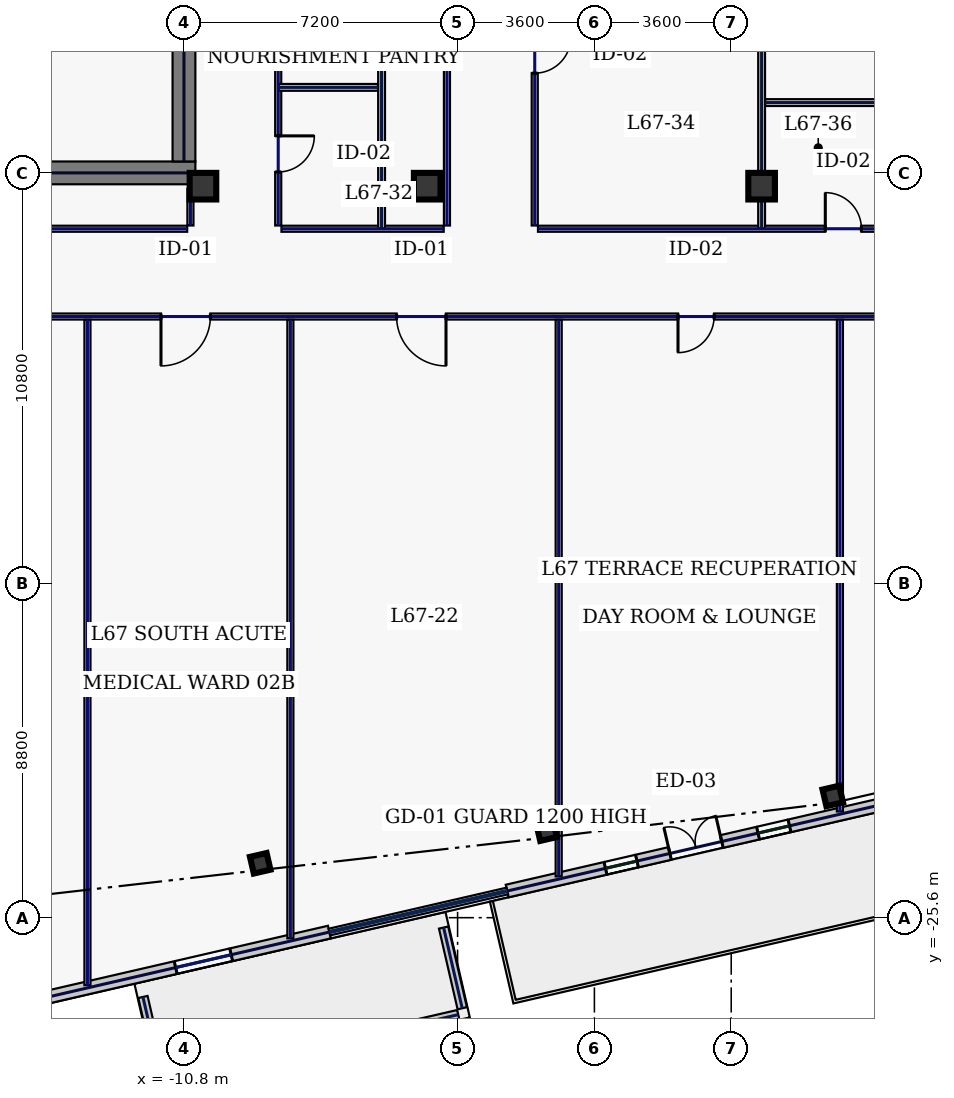
"""IFC4 building model, lengths in metres.
Left out: names, types, materials, properties, quantities, classifications, styles, units other than length and angle.
Written with IfcOpenShell. Run it as: python <this file> out.ifc"""

import sys

from ifc_helpers import new_model, si_unit, direction, frame, frame_2d, origin, origin_2d, place, context, subcontext, project, spatial, rectangle, hollow_rectangle, extrude, element, fill, save


model = new_model("IFC4")
c1 = context("Model", 3, precision=1e-05, world=origin(), true_north=direction((0.0, 1.0)))
c2 = subcontext(c1, "Body", "Model", "MODEL_VIEW")
j1 = project(units=[si_unit("LENGTHUNIT", "METRE"), si_unit("PLANEANGLEUNIT", "RADIAN")], contexts=[c1])
p1 = place(None, origin())
s1 = spatial("IfcSite", under=j1, at=p1, CompositionType="ELEMENT")
p2 = place(p1, origin())
s2 = spatial("IfcBuilding", under=s1, at=p2, CompositionType="ELEMENT")
p3 = place(p2, frame((0.0, 0.0, 289.0)))
s3 = spatial("IfcBuildingStorey", under=s2, at=p3, CompositionType="ELEMENT", Elevation=289.0)
p4 = place(p3, frame((-22.0, -6.0, 0.0), z_axis=(0.0, 0.0, 1.0), x_axis=(1.0, 0.0, 0.0)))
e1 = element("IfcWall", 1, at=p4, inside=s3, PredefinedType="SHEAR", context=c2, shape_type="SweptSolid", body=[
    extrude(rectangle(XDim=11.5, YDim=0.6, at=frame_2d((5.75, 0.0))), origin(), (0.0, 0.0, 1.0), 3.74),
])
p5 = place(p3, frame((-10.8, -5.7, 0.0), z_axis=(0.0, 0.0, 1.0), x_axis=(0.0, 1.0, 0.0)))
e2 = element("IfcWall", 2, at=p5, inside=s3, PredefinedType="SHEAR", context=c2, shape_type="SweptSolid", body=[
    extrude(rectangle(XDim=3.05, YDim=0.6, at=frame_2d((1.525, 0.0))), origin(), (0.0, 0.0, 1.0), 3.74),
])
for number, where, z_axis, x_axis in (
    (3, (-10.3, -6.35, 0.0), (0.0, 0.0, 1.0), (1.0, 0.0, 0.0)),
    (4, (-4.4, -6.35, 0.0), (0.0, 0.0, 1.0), (1.0, 0.0, 0.0)),
    (5, (4.4, -6.35, 0.0), (0.0, 0.0, 1.0), (1.0, 0.0, 0.0)),
):
    element("IfcColumn", number, at=place(p3, frame(where, z_axis=z_axis, x_axis=x_axis)), inside=s3, PredefinedType="COLUMN", context=c2, shape_type="SweptSolid", body=[
        extrude(hollow_rectangle(XDim=0.7, YDim=0.7, WallThickness=0.032, at=origin_2d()), origin(), (0.0, 0.0, 1.0), 3.74),
    ])
for number, where, z_axis, x_axis in (
    (6, (-8.794, -24.168, 0.0), (0.0, 0.0, 1.0), (0.974, 0.225, 0.0)),
    (7, (-1.258, -23.31, 0.0), (0.0, 0.0, 1.0), (0.974, 0.225, 0.0)),
    (8, (6.273, -22.397, 0.0), (0.0, 0.0, 1.0), (0.974, 0.225, 0.0)),
):
    element("IfcColumn", number, at=place(p3, frame(where, z_axis=z_axis, x_axis=x_axis)), inside=s3, PredefinedType="COLUMN", context=c2, shape_type="SweptSolid", body=[
        extrude(hollow_rectangle(XDim=0.45, YDim=0.45, WallThickness=0.022, at=origin_2d()), origin(), (0.0, 0.0, 1.0), 3.74),
    ])
p6 = place(p3, frame((-11.88, -27.686, 0.0), z_axis=(0.0, 0.0, 1.0), x_axis=(0.224998554752, -0.974359097232, 0.0)))
e9 = element("IfcWall", 9, at=p6, inside=s3, PredefinedType="PARAPET", context=c2, shape_type="SweptSolid", body=[
    extrude(rectangle(XDim=2.18, YDim=0.25, at=frame_2d((1.09, 0.0))), origin(), (0.0, 0.0, 1.0), 1.15),
])
p7 = place(p3, frame((-11.222, -29.915, 0.0), z_axis=(0.0, 0.0, 1.0), x_axis=(0.974369148124, 0.224955024802, 0.0)))
e10 = element("IfcWall", 10, at=p7, inside=s3, PredefinedType="PARAPET", context=c2, shape_type="SweptSolid", body=[
    extrude(rectangle(XDim=7.84, YDim=0.25, at=frame_2d((3.92, 0.0))), origin(), (0.0, 0.0, 1.0), 1.15),
])
p8 = place(p3, frame((-3.478, -27.983, 0.0), z_axis=(0.0, 0.0, 1.0), x_axis=(-0.224998554752, 0.974359097232, 0.0)))
e11 = element("IfcWall", 11, at=p8, inside=s3, PredefinedType="PARAPET", context=c2, shape_type="SweptSolid", body=[
    extrude(rectangle(XDim=2.18, YDim=0.25, at=frame_2d((1.09, 0.0))), origin(), (0.0, 0.0, 1.0), 1.15),
])
p9 = place(p3, frame((-24.03, -29.916, 0.0), z_axis=(0.0, 0.0, 1.0), x_axis=(0.974370978061, 0.224947098473, 0.0)))
e12 = element("IfcWall", 12, at=p9, inside=s3, PredefinedType="STANDARD", context=c2, shape_type="SweptSolid", body=[
    extrude(rectangle(XDim=17.506, YDim=0.34, at=frame_2d((8.753, 0.0))), origin(), (0.0, 0.0, 1.0), 3.74),
])
p10 = place(p9, frame((2.35, 0.0, 0.9)))
e13 = element("IfcOpeningElement", 13, at=p10, cuts=e12, PredefinedType="OPENING", context=c2, shape_type="SweptSolid", body=[
    extrude(rectangle(XDim=1.5, YDim=2.0, at=frame_2d((0.75, 1.0))), frame((0.0, 0.18, 0.0), z_axis=(0.0, -1.0, 0.0), x_axis=(1.0, 0.0, 0.0)), (0.0, 0.0, 1.0), 0.36),
])
p11 = place(p9, frame((5.817, 0.0, 0.9)))
e14 = element("IfcOpeningElement", 14, at=p11, cuts=e12, PredefinedType="OPENING", context=c2, shape_type="SweptSolid", body=[
    extrude(rectangle(XDim=1.5, YDim=2.0, at=frame_2d((0.75, 1.0))), frame((0.0, 0.18, 0.0), z_axis=(0.0, -1.0, 0.0), x_axis=(1.0, 0.0, 0.0)), (0.0, 0.0, 1.0), 0.36),
])
p12 = place(p9, frame((13.353, 0.0, 0.9)))
e15 = element("IfcOpeningElement", 15, at=p12, cuts=e12, PredefinedType="OPENING", context=c2, shape_type="SweptSolid", body=[
    extrude(rectangle(XDim=1.5, YDim=2.0, at=frame_2d((0.75, 1.0))), frame((0.0, 0.18, 0.0), z_axis=(0.0, -1.0, 0.0), x_axis=(1.0, 0.0, 0.0)), (0.0, 0.0, 1.0), 0.36),
])
p13 = place(p3, frame((-2.295, -24.898, 0.0), z_axis=(0.0, 0.0, 1.0), x_axis=(0.974370872906, 0.224947553958, 0.0)))
e16 = element("IfcWall", 16, at=p13, inside=s3, PredefinedType="STANDARD", context=c2, shape_type="SweptSolid", body=[
    extrude(rectangle(XDim=10.328, YDim=0.34, at=frame_2d((5.164, 0.0))), origin(), (0.0, 0.0, 1.0), 3.74),
])
p14 = place(p13, frame((4.394, 0.0, 0.0)))
e17 = element("IfcOpeningElement", 17, at=p14, cuts=e16, PredefinedType="OPENING", context=c2, shape_type="SweptSolid", body=[
    extrude(rectangle(XDim=1.4, YDim=2.2, at=frame_2d((0.7, 1.1))), frame((0.0, 0.18, 0.0), z_axis=(0.0, -1.0, 0.0), x_axis=(1.0, 0.0, 0.0)), (0.0, 0.0, 1.0), 0.36),
])
p15 = place(p13, frame((2.655, 0.0, 0.9)))
e18 = element("IfcOpeningElement", 18, at=p15, cuts=e16, PredefinedType="OPENING", context=c2, shape_type="SweptSolid", body=[
    extrude(rectangle(XDim=0.85, YDim=1.85, at=frame_2d((0.425, 0.925))), frame((0.0, 0.18, 0.0), z_axis=(0.0, -1.0, 0.0), x_axis=(1.0, 0.0, 0.0)), (0.0, 0.0, 1.0), 0.36),
])
p16 = place(p13, frame((6.774, 0.0, 0.9)))
e19 = element("IfcOpeningElement", 19, at=p16, cuts=e16, PredefinedType="OPENING", context=c2, shape_type="SweptSolid", body=[
    extrude(rectangle(XDim=0.85, YDim=1.85, at=frame_2d((0.425, 0.925))), frame((0.0, 0.18, 0.0), z_axis=(0.0, -1.0, 0.0), x_axis=(1.0, 0.0, 0.0)), (0.0, 0.0, 1.0), 0.36),
])
p17 = place(p3, frame((12.535, -9.78, 0.0), z_axis=(0.0, 0.0, 1.0), x_axis=(-1.0, 0.0, 0.0)))
e20 = element("IfcWall", 20, at=p17, inside=s3, PredefinedType="PARTITIONING", context=c2, shape_type="SweptSolid", body=[
    extrude(rectangle(XDim=36.68, YDim=0.16, at=frame_2d((18.34, 0.0))), origin(), (0.0, 0.0, 1.0), 3.74),
])
p18 = place(p17, frame((33.856, 0.0, 0.0)))
e21 = element("IfcOpeningElement", 21, at=p18, cuts=e20, PredefinedType="OPENING", context=c2, shape_type="SweptSolid", body=[
    extrude(rectangle(XDim=1.05, YDim=2.2, at=frame_2d((0.525, 1.1))), frame((0.0, 0.09, 0.0), z_axis=(0.0, -1.0, 0.0), x_axis=(1.0, 0.0, 0.0)), (0.0, 0.0, 1.0), 0.18),
])
p19 = place(p17, frame((28.43, 0.0, 0.0)))
e22 = element("IfcOpeningElement", 22, at=p19, cuts=e20, PredefinedType="OPENING", context=c2, shape_type="SweptSolid", body=[
    extrude(rectangle(XDim=1.3, YDim=2.2, at=frame_2d((0.65, 1.1))), frame((0.0, 0.09, 0.0), z_axis=(0.0, -1.0, 0.0), x_axis=(1.0, 0.0, 0.0)), (0.0, 0.0, 1.0), 0.18),
])
p20 = place(p17, frame((22.64, 0.0, 0.0)))
e23 = element("IfcOpeningElement", 23, at=p20, cuts=e20, PredefinedType="OPENING", context=c2, shape_type="SweptSolid", body=[
    extrude(rectangle(XDim=1.3, YDim=2.2, at=frame_2d((0.65, 1.1))), frame((0.0, 0.09, 0.0), z_axis=(0.0, -1.0, 0.0), x_axis=(1.0, 0.0, 0.0)), (0.0, 0.0, 1.0), 0.18),
])
p21 = place(p17, frame((16.44, 0.0, 0.0)))
e24 = element("IfcOpeningElement", 24, at=p21, cuts=e20, PredefinedType="OPENING", context=c2, shape_type="SweptSolid", body=[
    extrude(rectangle(XDim=1.3, YDim=2.2, at=frame_2d((0.65, 1.1))), frame((0.0, 0.09, 0.0), z_axis=(0.0, -1.0, 0.0), x_axis=(1.0, 0.0, 0.0)), (0.0, 0.0, 1.0), 0.18),
])
p22 = place(p17, frame((9.385, 0.0, 0.0)))
e25 = element("IfcOpeningElement", 25, at=p22, cuts=e20, PredefinedType="OPENING", context=c2, shape_type="SweptSolid", body=[
    extrude(rectangle(XDim=0.95, YDim=2.2, at=frame_2d((0.475, 1.1))), frame((0.0, 0.09, 0.0), z_axis=(0.0, -1.0, 0.0), x_axis=(1.0, 0.0, 0.0)), (0.0, 0.0, 1.0), 0.18),
])
p23 = place(p17, frame((2.799, 0.0, 0.0)))
e26 = element("IfcOpeningElement", 26, at=p23, cuts=e20, PredefinedType="OPENING", context=c2, shape_type="SweptSolid", body=[
    extrude(rectangle(XDim=1.05, YDim=2.2, at=frame_2d((0.525, 1.1))), frame((0.0, 0.09, 0.0), z_axis=(0.0, -1.0, 0.0), x_axis=(1.0, 0.0, 0.0)), (0.0, 0.0, 1.0), 0.18),
])
p24 = place(p3, frame((-1.57, 7.435, 0.0), z_axis=(0.0, 0.0, 1.0), x_axis=(0.0, -1.0, 0.0)))
e27 = element("IfcWall", 27, at=p24, inside=s3, PredefinedType="PARTITIONING", context=c2, shape_type="SweptSolid", body=[
    extrude(rectangle(XDim=14.82, YDim=0.16, at=frame_2d((7.41, 0.0))), origin(), (0.0, 0.0, 1.0), 3.74),
])
p25 = place(p24, frame((9.861, 0.0, 0.0)))
e28 = element("IfcOpeningElement", 28, at=p25, cuts=e27, PredefinedType="OPENING", context=c2, shape_type="SweptSolid", body=[
    extrude(rectangle(XDim=0.95, YDim=2.2, at=frame_2d((0.475, 1.1))), frame((0.0, 0.09, 0.0), z_axis=(0.0, -1.0, 0.0), x_axis=(1.0, 0.0, 0.0)), (0.0, 0.0, 1.0), 0.18),
])
p26 = place(p24, frame((2.754, 0.0, 0.0)))
e29 = element("IfcOpeningElement", 29, at=p26, cuts=e27, PredefinedType="OPENING", context=c2, shape_type="SweptSolid", body=[
    extrude(rectangle(XDim=0.95, YDim=2.2, at=frame_2d((0.475, 1.1))), frame((0.0, 0.09, 0.0), z_axis=(0.0, -1.0, 0.0), x_axis=(1.0, 0.0, 0.0)), (0.0, 0.0, 1.0), 0.18),
])
p27 = place(p3, frame((-1.485, -7.47, 0.0), z_axis=(0.0, 0.0, 1.0), x_axis=(1.0, 0.0, 0.0)))
e30 = element("IfcWall", 30, at=p27, inside=s3, PredefinedType="PARTITIONING", context=c2, shape_type="SweptSolid", body=[
    extrude(rectangle(XDim=9.72, YDim=0.16, at=frame_2d((4.86, 0.0))), origin(), (0.0, 0.0, 1.0), 3.74),
])
p28 = place(p27, frame((7.561, 0.0, 0.0)))
e31 = element("IfcOpeningElement", 31, at=p28, cuts=e30, PredefinedType="OPENING", context=c2, shape_type="SweptSolid", body=[
    extrude(rectangle(XDim=0.95, YDim=2.2, at=frame_2d((0.475, 1.1))), frame((0.0, 0.09, 0.0), z_axis=(0.0, -1.0, 0.0), x_axis=(1.0, 0.0, 0.0)), (0.0, 0.0, 1.0), 0.18),
])
p29 = place(p3, frame((-3.88, -7.385, 0.0), z_axis=(0.0, 0.0, 1.0), x_axis=(0.0, 1.0, 0.0)))
e32 = element("IfcWall", 32, at=p29, inside=s3, PredefinedType="PARTITIONING", context=c2, shape_type="SweptSolid", body=[
    extrude(rectangle(XDim=14.82, YDim=0.16, at=frame_2d((7.41, 0.0))), origin(), (0.0, 0.0, 1.0), 3.74),
])
p30 = place(p3, frame((-8.32, 7.435, 0.0), z_axis=(0.0, 0.0, 1.0), x_axis=(0.0, -1.0, 0.0)))
e33 = element("IfcWall", 33, at=p30, inside=s3, PredefinedType="PARTITIONING", context=c2, shape_type="SweptSolid", body=[
    extrude(rectangle(XDim=14.82, YDim=0.16, at=frame_2d((7.41, 0.0))), origin(), (0.0, 0.0, 1.0), 3.74),
])
p31 = place(p30, frame((12.461, 0.0, 0.0)))
e34 = element("IfcOpeningElement", 34, at=p31, cuts=e33, PredefinedType="OPENING", context=c2, shape_type="SweptSolid", body=[
    extrude(rectangle(XDim=0.95, YDim=2.2, at=frame_2d((0.475, 1.1))), frame((0.0, 0.09, 0.0), z_axis=(0.0, -1.0, 0.0), x_axis=(1.0, 0.0, 0.0)), (0.0, 0.0, 1.0), 0.18),
])
p32 = place(p30, frame((5.354, 0.0, 0.0)))
e35 = element("IfcOpeningElement", 35, at=p32, cuts=e33, PredefinedType="OPENING", context=c2, shape_type="SweptSolid", body=[
    extrude(rectangle(XDim=0.95, YDim=2.2, at=frame_2d((0.475, 1.1))), frame((0.0, 0.09, 0.0), z_axis=(0.0, -1.0, 0.0), x_axis=(1.0, 0.0, 0.0)), (0.0, 0.0, 1.0), 0.18),
])
p33 = place(p3, frame((-8.235, -7.47, 0.0), z_axis=(0.0, 0.0, 1.0), x_axis=(1.0, 0.0, 0.0)))
e36 = element("IfcWall", 36, at=p33, inside=s3, PredefinedType="PARTITIONING", context=c2, shape_type="SweptSolid", body=[
    extrude(rectangle(XDim=4.27, YDim=0.16, at=frame_2d((2.135, 0.0))), origin(), (0.0, 0.0, 1.0), 3.74),
])
p34 = place(p3, frame((-10.63, -7.385, 0.0), z_axis=(0.0, 0.0, 1.0), x_axis=(0.0, 1.0, 0.0)))
e37 = element("IfcWall", 37, at=p34, inside=s3, PredefinedType="PARTITIONING", context=c2, shape_type="SweptSolid", body=[
    extrude(rectangle(XDim=0.965, YDim=0.16, at=frame_2d((0.482, 0.0))), origin(), (0.0, 0.0, 1.0), 3.74),
])
p35 = place(p3, frame((-21.915, -7.47, 0.0), z_axis=(0.0, 0.0, 1.0), x_axis=(1.0, 0.0, 0.0)))
e38 = element("IfcWall", 38, at=p35, inside=s3, PredefinedType="PARTITIONING", context=c2, shape_type="SweptSolid", body=[
    extrude(rectangle(XDim=11.2, YDim=0.16, at=frame_2d((5.6, 0.0))), origin(), (0.0, 0.0, 1.0), 3.74),
])
p36 = place(p3, frame((-8.0, -26.144, 0.0), z_axis=(0.0, 0.0, 1.0), x_axis=(0.0, 1.0, 0.0)))
e39 = element("IfcWall", 39, at=p36, inside=s3, PredefinedType="PARTITIONING", context=c2, shape_type="SweptSolid", body=[
    extrude(rectangle(XDim=16.279, YDim=0.16, at=frame_2d((8.139, 0.0))), origin(), (0.0, 0.0, 1.0), 3.74),
])
p37 = place(p3, frame((-0.94, -24.514, 0.0), z_axis=(0.0, 0.0, 1.0), x_axis=(0.0, 1.0, 0.0)))
e40 = element("IfcWall", 40, at=p37, inside=s3, PredefinedType="PARTITIONING", context=c2, shape_type="SweptSolid", body=[
    extrude(rectangle(XDim=14.649, YDim=0.16, at=frame_2d((7.324, 0.0))), origin(), (0.0, 0.0, 1.0), 3.74),
])
p38 = place(p3, frame((6.46, -22.805, 0.0), z_axis=(0.0, 0.0, 1.0), x_axis=(0.0, 1.0, 0.0)))
e41 = element("IfcWall", 41, at=p38, inside=s3, PredefinedType="PARTITIONING", context=c2, shape_type="SweptSolid", body=[
    extrude(rectangle(XDim=12.94, YDim=0.16, at=frame_2d((6.47, 0.0))), origin(), (0.0, 0.0, 1.0), 3.74),
])
p39 = place(p3, frame((-13.34, -27.376, 0.0), z_axis=(0.0, 0.0, 1.0), x_axis=(0.0, 1.0, 0.0)))
e42 = element("IfcWall", 42, at=p39, inside=s3, PredefinedType="PARTITIONING", context=c2, shape_type="SweptSolid", body=[
    extrude(rectangle(XDim=17.511, YDim=0.16, at=frame_2d((8.756, 0.0))), origin(), (0.0, 0.0, 1.0), 3.74),
])
p40 = place(p3, frame((-5.6, -7.465, 0.0), z_axis=(0.0, 0.0, 1.0), x_axis=(0.0, 1.0, 0.0)))
e43 = element("IfcWall", 43, at=p40, inside=s3, PredefinedType="PARTITIONING", context=c2, shape_type="SweptSolid", body=[
    extrude(rectangle(XDim=14.98, YDim=0.18, at=frame_2d((7.49, 0.0))), origin(), (0.0, 0.0, 1.0), 3.74),
])
p41 = place(p3, frame((4.4, -7.465, 0.0), z_axis=(0.0, 0.0, 1.0), x_axis=(0.0, 1.0, 0.0)))
e44 = element("IfcWall", 44, at=p41, inside=s3, PredefinedType="PARTITIONING", context=c2, shape_type="SweptSolid", body=[
    extrude(rectangle(XDim=14.98, YDim=0.18, at=frame_2d((7.49, 0.0))), origin(), (0.0, 0.0, 1.0), 3.035),
])
p42 = place(p3, frame((-8.315, -3.75, 0.0), z_axis=(0.0, 0.0, 1.0), x_axis=(1.0, 0.0, 0.0)))
e45 = element("IfcWall", 45, at=p42, inside=s3, PredefinedType="PARTITIONING", context=c2, shape_type="SweptSolid", body=[
    extrude(rectangle(XDim=2.62, YDim=0.18, at=frame_2d((1.31, 0.0))), origin(), (0.0, 0.0, 1.0), 3.74),
])
p43 = place(p3, frame((4.495, -4.15, 0.0), z_axis=(0.0, 0.0, 1.0), x_axis=(1.0, 0.0, 0.0)))
e46 = element("IfcWall", 46, at=p43, inside=s3, PredefinedType="PARTITIONING", context=c2, shape_type="SweptSolid", body=[
    extrude(rectangle(XDim=3.82, YDim=0.18, at=frame_2d((1.91, 0.0))), origin(), (0.0, 0.0, 1.0), 3.74),
])
p44 = place(p12, origin())
e47 = element("IfcWindow", 47, at=p44, inside=s3, PartitioningType="SINGLE_PANEL", PredefinedType="WINDOW", context=c2, shape_type="SweptSolid", body=[
    extrude(rectangle(XDim=1.5, YDim=2.0, at=frame_2d((0.75, 1.0))), frame((0.0, 0.03, 0.0), z_axis=(0.0, -1.0, 0.0), x_axis=(1.0, 0.0, 0.0)), (0.0, 0.0, 1.0), 0.06),
])
fill(e15, e47)
p45 = place(p14, origin())
e48 = element("IfcDoor", 48, at=p45, inside=s3, OperationType="DOUBLE_SWING_LEFT", PredefinedType="DOOR", context=c2, shape_type="SweptSolid", body=[
    extrude(rectangle(XDim=1.4, YDim=2.2, at=frame_2d((0.7, 1.1))), frame((0.0, 0.025, 0.0), z_axis=(0.0, -1.0, 0.0), x_axis=(1.0, 0.0, 0.0)), (0.0, 0.0, 1.0), 0.05),
])
fill(e17, e48)
p46 = place(p15, origin())
e49 = element("IfcWindow", 49, at=p46, inside=s3, PartitioningType="SINGLE_PANEL", PredefinedType="WINDOW", context=c2, shape_type="SweptSolid", body=[
    extrude(rectangle(XDim=0.85, YDim=1.85, at=frame_2d((0.425, 0.925))), frame((0.0, 0.03, 0.0), z_axis=(0.0, -1.0, 0.0), x_axis=(1.0, 0.0, 0.0)), (0.0, 0.0, 1.0), 0.06),
])
fill(e18, e49)
p47 = place(p16, origin())
e50 = element("IfcWindow", 50, at=p47, inside=s3, PartitioningType="SINGLE_PANEL", PredefinedType="WINDOW", context=c2, shape_type="SweptSolid", body=[
    extrude(rectangle(XDim=0.85, YDim=1.85, at=frame_2d((0.425, 0.925))), frame((0.0, 0.03, 0.0), z_axis=(0.0, -1.0, 0.0), x_axis=(1.0, 0.0, 0.0)), (0.0, 0.0, 1.0), 0.06),
])
fill(e19, e50)
p48 = place(p20, origin())
e51 = element("IfcDoor", 51, at=p48, inside=s3, OperationType="SINGLE_SWING_RIGHT", PredefinedType="DOOR", context=c2, shape_type="SweptSolid", body=[
    extrude(rectangle(XDim=1.3, YDim=2.2, at=frame_2d((0.65, 1.1))), frame((0.0, 0.025, 0.0), z_axis=(0.0, -1.0, 0.0), x_axis=(1.0, 0.0, 0.0)), (0.0, 0.0, 1.0), 0.05),
])
fill(e23, e51)
p49 = place(p21, origin())
e52 = element("IfcDoor", 52, at=p49, inside=s3, OperationType="SINGLE_SWING_LEFT", PredefinedType="DOOR", context=c2, shape_type="SweptSolid", body=[
    extrude(rectangle(XDim=1.3, YDim=2.2, at=frame_2d((0.65, 1.1))), frame((0.0, 0.025, 0.0), z_axis=(0.0, -1.0, 0.0), x_axis=(1.0, 0.0, 0.0)), (0.0, 0.0, 1.0), 0.05),
])
fill(e24, e52)
p50 = place(p22, origin())
e53 = element("IfcDoor", 53, at=p50, inside=s3, OperationType="SINGLE_SWING_RIGHT", PredefinedType="DOOR", context=c2, shape_type="SweptSolid", body=[
    extrude(rectangle(XDim=0.95, YDim=2.2, at=frame_2d((0.475, 1.1))), frame((0.0, 0.025, 0.0), z_axis=(0.0, -1.0, 0.0), x_axis=(1.0, 0.0, 0.0)), (0.0, 0.0, 1.0), 0.05),
])
fill(e25, e53)
p51 = place(p31, origin())
e54 = element("IfcDoor", 54, at=p51, inside=s3, OperationType="SINGLE_SWING_LEFT", PredefinedType="DOOR", context=c2, shape_type="SweptSolid", body=[
    extrude(rectangle(XDim=0.95, YDim=2.2, at=frame_2d((0.475, 1.1))), frame((0.0, 0.025, 0.0), z_axis=(0.0, -1.0, 0.0), x_axis=(1.0, 0.0, 0.0)), (0.0, 0.0, 1.0), 0.05),
])
fill(e34, e54)
p52 = place(p25, origin())
e55 = element("IfcDoor", 55, at=p52, inside=s3, OperationType="SINGLE_SWING_LEFT", PredefinedType="DOOR", context=c2, shape_type="SweptSolid", body=[
    extrude(rectangle(XDim=0.95, YDim=2.2, at=frame_2d((0.475, 1.1))), frame((0.0, 0.025, 0.0), z_axis=(0.0, -1.0, 0.0), x_axis=(1.0, 0.0, 0.0)), (0.0, 0.0, 1.0), 0.05),
])
fill(e28, e55)
p53 = place(p28, origin())
e56 = element("IfcDoor", 56, at=p53, inside=s3, OperationType="SINGLE_SWING_LEFT", PredefinedType="DOOR", context=c2, shape_type="SweptSolid", body=[
    extrude(rectangle(XDim=0.95, YDim=2.2, at=frame_2d((0.475, 1.1))), frame((0.0, 0.025, 0.0), z_axis=(0.0, -1.0, 0.0), x_axis=(1.0, 0.0, 0.0)), (0.0, 0.0, 1.0), 0.05),
])
fill(e31, e56)
save(model, sys.argv[1])
